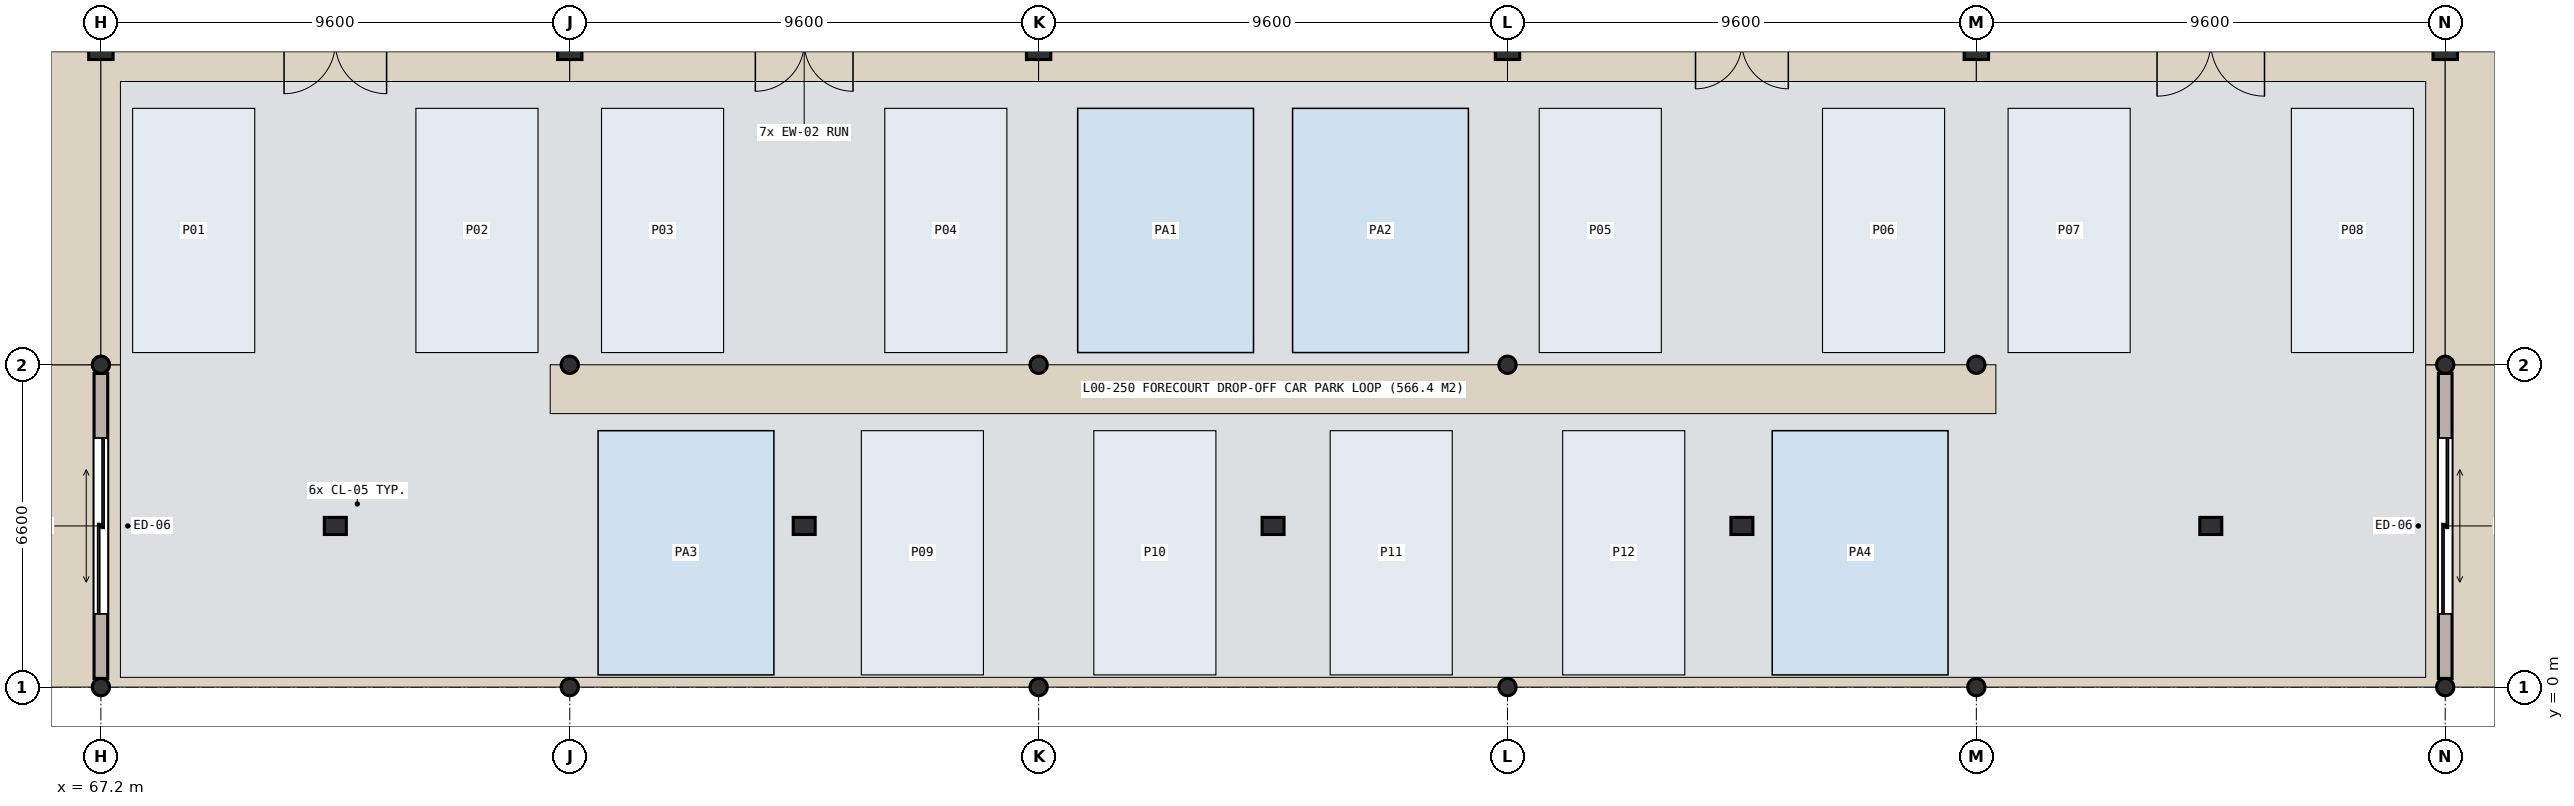
"""IFC4 building model, lengths in metres.
Left out: names, types, materials, properties, quantities, classifications, styles, units other than length and angle.
Written with IfcOpenShell. Run it as: python <this file> out.ifc"""

import sys

from ifc_helpers import new_model, si_unit, direction, frame, frame_2d, origin, origin_2d, place, context, subcontext, project, spatial, rectangle, hollow_rectangle, hollow_circle, extrude, element, fill, save


model = new_model("IFC4")
c1 = context("Model", 3, precision=1e-05, world=origin(), true_north=direction((0.0, 1.0)))
c2 = subcontext(c1, "Body", "Model", "MODEL_VIEW")
j1 = project(units=[si_unit("LENGTHUNIT", "METRE"), si_unit("PLANEANGLEUNIT", "RADIAN")], contexts=[c1])
p1 = place(None, origin())
s1 = spatial("IfcSite", under=j1, at=p1, CompositionType="ELEMENT")
p2 = place(p1, origin())
s2 = spatial("IfcBuilding", under=s1, at=p2, CompositionType="ELEMENT")
p3 = place(p2, origin())
s3 = spatial("IfcBuildingStorey", under=s2, at=p3, CompositionType="ELEMENT", Elevation=0.0)
for number, where, z_axis, x_axis in (
    (1, (67.2, 0.0, 0.0), (0.0, 0.0, 1.0), (1.0, 0.0, 0.0)),
    (2, (67.2, 6.6, 0.0), (0.0, 0.0, 1.0), (1.0, 0.0, 0.0)),
):
    element("IfcColumn", number, at=place(p3, frame(where, z_axis=z_axis, x_axis=x_axis)), inside=s3, PredefinedType="COLUMN", context=c2, shape_type="SweptSolid", body=[
        extrude(hollow_circle(Radius=0.178, WallThickness=0.016, at=origin_2d()), origin(), (0.0, 0.0, 1.0), 5.388),
    ])
p4 = place(p3, frame((67.2, 13.2, 0.0), z_axis=(0.0, 0.0, 1.0), x_axis=(1.0, 0.0, 0.0)))
e3 = element("IfcColumn", 3, at=p4, inside=s3, PredefinedType="COLUMN", context=c2, shape_type="SweptSolid", body=[
    extrude(hollow_rectangle(XDim=0.5, YDim=0.7, WallThickness=0.032, at=origin_2d()), origin(), (0.0, 0.0, 1.0), 5.4),
])
for number, where, z_axis, x_axis in (
    (4, (76.8, 0.0, 0.0), (0.0, 0.0, 1.0), (1.0, 0.0, 0.0)),
    (5, (76.8, 6.6, 0.0), (0.0, 0.0, 1.0), (1.0, 0.0, 0.0)),
):
    element("IfcColumn", number, at=place(p3, frame(where, z_axis=z_axis, x_axis=x_axis)), inside=s3, PredefinedType="COLUMN", context=c2, shape_type="SweptSolid", body=[
        extrude(hollow_circle(Radius=0.178, WallThickness=0.016, at=origin_2d()), origin(), (0.0, 0.0, 1.0), 5.388),
    ])
p5 = place(p3, frame((76.8, 13.2, 0.0), z_axis=(0.0, 0.0, 1.0), x_axis=(1.0, 0.0, 0.0)))
e6 = element("IfcColumn", 6, at=p5, inside=s3, PredefinedType="COLUMN", context=c2, shape_type="SweptSolid", body=[
    extrude(hollow_rectangle(XDim=0.5, YDim=0.7, WallThickness=0.032, at=origin_2d()), origin(), (0.0, 0.0, 1.0), 5.4),
])
for number, where, z_axis, x_axis in (
    (7, (86.4, 0.0, 0.0), (0.0, 0.0, 1.0), (1.0, 0.0, 0.0)),
    (8, (86.4, 6.6, 0.0), (0.0, 0.0, 1.0), (1.0, 0.0, 0.0)),
):
    element("IfcColumn", number, at=place(p3, frame(where, z_axis=z_axis, x_axis=x_axis)), inside=s3, PredefinedType="COLUMN", context=c2, shape_type="SweptSolid", body=[
        extrude(hollow_circle(Radius=0.178, WallThickness=0.016, at=origin_2d()), origin(), (0.0, 0.0, 1.0), 5.388),
    ])
p6 = place(p3, frame((86.4, 13.2, 0.0), z_axis=(0.0, 0.0, 1.0), x_axis=(1.0, 0.0, 0.0)))
e9 = element("IfcColumn", 9, at=p6, inside=s3, PredefinedType="COLUMN", context=c2, shape_type="SweptSolid", body=[
    extrude(hollow_rectangle(XDim=0.5, YDim=0.7, WallThickness=0.032, at=origin_2d()), origin(), (0.0, 0.0, 1.0), 5.4),
])
for number, where, z_axis, x_axis in (
    (10, (96.0, 0.0, 0.0), (0.0, 0.0, 1.0), (1.0, 0.0, 0.0)),
    (11, (96.0, 6.6, 0.0), (0.0, 0.0, 1.0), (1.0, 0.0, 0.0)),
):
    element("IfcColumn", number, at=place(p3, frame(where, z_axis=z_axis, x_axis=x_axis)), inside=s3, PredefinedType="COLUMN", context=c2, shape_type="SweptSolid", body=[
        extrude(hollow_circle(Radius=0.178, WallThickness=0.016, at=origin_2d()), origin(), (0.0, 0.0, 1.0), 5.388),
    ])
p7 = place(p3, frame((96.0, 13.2, 0.0), z_axis=(0.0, 0.0, 1.0), x_axis=(1.0, 0.0, 0.0)))
e12 = element("IfcColumn", 12, at=p7, inside=s3, PredefinedType="COLUMN", context=c2, shape_type="SweptSolid", body=[
    extrude(hollow_rectangle(XDim=0.5, YDim=0.7, WallThickness=0.032, at=origin_2d()), origin(), (0.0, 0.0, 1.0), 5.4),
])
for number, where, z_axis, x_axis in (
    (13, (105.6, 0.0, 0.0), (0.0, 0.0, 1.0), (1.0, 0.0, 0.0)),
    (14, (105.6, 6.6, 0.0), (0.0, 0.0, 1.0), (1.0, 0.0, 0.0)),
):
    element("IfcColumn", number, at=place(p3, frame(where, z_axis=z_axis, x_axis=x_axis)), inside=s3, PredefinedType="COLUMN", context=c2, shape_type="SweptSolid", body=[
        extrude(hollow_circle(Radius=0.178, WallThickness=0.016, at=origin_2d()), origin(), (0.0, 0.0, 1.0), 5.388),
    ])
p8 = place(p3, frame((105.6, 13.2, 0.0), z_axis=(0.0, 0.0, 1.0), x_axis=(1.0, 0.0, 0.0)))
e15 = element("IfcColumn", 15, at=p8, inside=s3, PredefinedType="COLUMN", context=c2, shape_type="SweptSolid", body=[
    extrude(hollow_rectangle(XDim=0.5, YDim=0.7, WallThickness=0.032, at=origin_2d()), origin(), (0.0, 0.0, 1.0), 5.4),
])
for number, where, z_axis, x_axis in (
    (16, (115.2, 0.0, 0.0), (0.0, 0.0, 1.0), (1.0, 0.0, 0.0)),
    (17, (115.2, 6.6, 0.0), (0.0, 0.0, 1.0), (1.0, 0.0, 0.0)),
):
    element("IfcColumn", number, at=place(p3, frame(where, z_axis=z_axis, x_axis=x_axis)), inside=s3, PredefinedType="COLUMN", context=c2, shape_type="SweptSolid", body=[
        extrude(hollow_circle(Radius=0.178, WallThickness=0.016, at=origin_2d()), origin(), (0.0, 0.0, 1.0), 5.388),
    ])
p9 = place(p3, frame((115.2, 13.2, 0.0), z_axis=(0.0, 0.0, 1.0), x_axis=(1.0, 0.0, 0.0)))
e18 = element("IfcColumn", 18, at=p9, inside=s3, PredefinedType="COLUMN", context=c2, shape_type="SweptSolid", body=[
    extrude(hollow_rectangle(XDim=0.5, YDim=0.7, WallThickness=0.032, at=origin_2d()), origin(), (0.0, 0.0, 1.0), 5.4),
])
for number, where, z_axis, x_axis in (
    (19, (72.0, 3.3, 0.0), (0.0, 0.0, 1.0), (1.0, 0.0, 0.0)),
    (20, (81.6, 3.3, 0.0), (0.0, 0.0, 1.0), (1.0, 0.0, 0.0)),
    (21, (91.2, 3.3, 0.0), (0.0, 0.0, 1.0), (1.0, 0.0, 0.0)),
    (22, (100.8, 3.3, 0.0), (0.0, 0.0, 1.0), (1.0, 0.0, 0.0)),
    (23, (110.4, 3.3, 0.0), (0.0, 0.0, 1.0), (1.0, 0.0, 0.0)),
):
    element("IfcColumn", number, at=place(p3, frame(where, z_axis=z_axis, x_axis=x_axis)), inside=s3, PredefinedType="PILASTER", context=c2, shape_type="SweptSolid", body=[
        extrude(rectangle(XDim=0.45, YDim=0.35, at=origin_2d()), origin(), (0.0, 0.0, 1.0), 5.24),
    ])
p10 = place(p3, frame((67.2, 0.178, 0.0), z_axis=(0.0, 0.0, 1.0), x_axis=(0.0, 1.0, 0.0)))
e24 = element("IfcWall", 24, at=p10, inside=s3, PredefinedType="SOLIDWALL", context=c2, shape_type="SweptSolid", body=[
    extrude(rectangle(XDim=6.244, YDim=0.28, at=frame_2d((3.122, 0.0))), origin(), (0.0, 0.0, 1.0), 4.8),
])
p11 = place(p10, frame((1.322, 0.0, 0.0)))
e25 = element("IfcOpeningElement", 25, at=p11, cuts=e24, PredefinedType="OPENING", context=c2, shape_type="SweptSolid", body=[
    extrude(rectangle(XDim=3.6, YDim=3.1, at=frame_2d((1.8, 1.55))), frame((0.0, 0.15, 0.0), z_axis=(0.0, -1.0, 0.0), x_axis=(1.0, 0.0, 0.0)), (0.0, 0.0, 1.0), 0.3),
])
p12 = place(p3, frame((115.2, 6.422, 0.0), z_axis=(0.0, 0.0, 1.0), x_axis=(0.0, -1.0, 0.0)))
e26 = element("IfcWall", 26, at=p12, inside=s3, PredefinedType="SOLIDWALL", context=c2, shape_type="SweptSolid", body=[
    extrude(rectangle(XDim=6.244, YDim=0.28, at=frame_2d((3.122, 0.0))), origin(), (0.0, 0.0, 1.0), 4.8),
])
p13 = place(p12, frame((1.322, 0.0, 0.0)))
e27 = element("IfcOpeningElement", 27, at=p13, cuts=e26, PredefinedType="OPENING", context=c2, shape_type="SweptSolid", body=[
    extrude(rectangle(XDim=3.6, YDim=3.1, at=frame_2d((1.8, 1.55))), frame((0.0, 0.15, 0.0), z_axis=(0.0, -1.0, 0.0), x_axis=(1.0, 0.0, 0.0)), (0.0, 0.0, 1.0), 0.3),
])
p14 = place(p11, origin())
e28 = element("IfcDoor", 28, at=p14, inside=s3, OperationType="DOUBLE_DOOR_SLIDING", PredefinedType="DOOR", context=c2, shape_type="SweptSolid", body=[
    extrude(rectangle(XDim=3.6, YDim=3.1, at=frame_2d((1.8, 1.55))), frame((0.0, 0.025, 0.0), z_axis=(0.0, -1.0, 0.0), x_axis=(1.0, 0.0, 0.0)), (0.0, 0.0, 1.0), 0.05),
])
fill(e25, e28)
p15 = place(p13, origin())
e29 = element("IfcDoor", 29, at=p15, inside=s3, OperationType="DOUBLE_DOOR_SLIDING", PredefinedType="DOOR", context=c2, shape_type="SweptSolid", body=[
    extrude(rectangle(XDim=3.6, YDim=3.1, at=frame_2d((1.8, 1.55))), frame((0.0, 0.025, 0.0), z_axis=(0.0, -1.0, 0.0), x_axis=(1.0, 0.0, 0.0)), (0.0, 0.0, 1.0), 0.05),
])
fill(e27, e29)
save(model, sys.argv[1])
